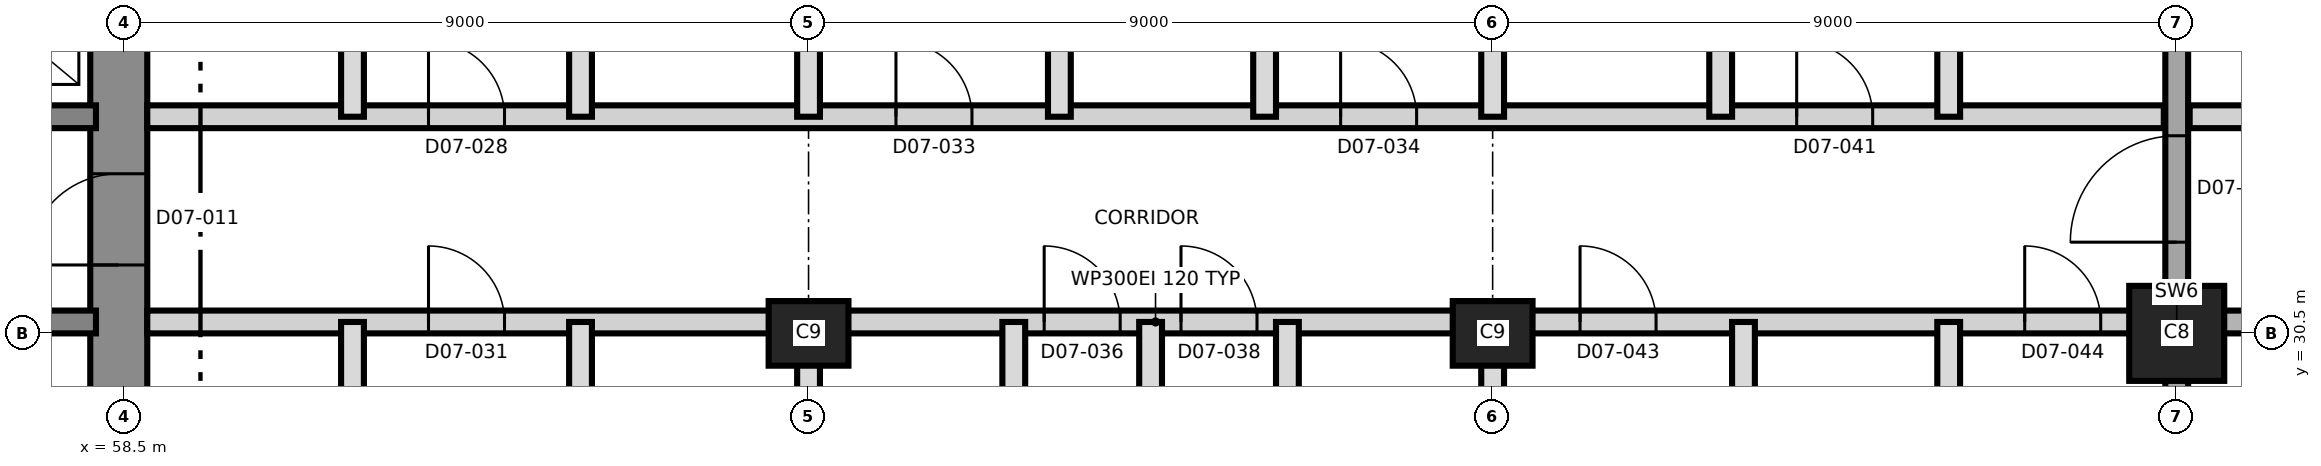
"""IFC4 building model, lengths in metres.
Left out: names, types, materials, properties, quantities, classifications, styles, units other than length and angle.
Written with IfcOpenShell. Run it as: python <this file> out.ifc"""

import sys

from ifc_helpers import new_model, si_unit, direction, frame, frame_2d, origin, origin_2d, place, context, subcontext, project, spatial, rectangle, extrude, element, fill, save


model = new_model("IFC4")
c1 = context("Model", 3, precision=1e-05, world=origin(), true_north=direction((0.0, 1.0)))
c2 = subcontext(c1, "Body", "Model", "MODEL_VIEW")
j1 = project(units=[si_unit("LENGTHUNIT", "METRE"), si_unit("PLANEANGLEUNIT", "RADIAN")], contexts=[c1])
p1 = place(None, origin())
s1 = spatial("IfcSite", under=j1, at=p1, CompositionType="ELEMENT")
p2 = place(p1, origin())
s2 = spatial("IfcBuilding", under=s1, at=p2, CompositionType="ELEMENT")
p3 = place(p2, frame((0.0, 0.0, 94.5)))
s3 = spatial("IfcBuildingStorey", under=s2, at=p3, CompositionType="ELEMENT", Elevation=94.5)
p4 = place(p3, frame((58.425, 21.125, 0.0), z_axis=(0.0, 0.0, 1.0), x_axis=(0.0, 1.0, 0.0)))
e1 = element("IfcWall", 1, at=p4, inside=s3, PredefinedType="SHEAR", context=c2, shape_type="SweptSolid", body=[
    extrude(rectangle(XDim=18.75, YDim=0.75, at=frame_2d((9.375, 0.0))), origin(), (0.0, 0.0, 1.0), 3.7),
])
p5 = place(p4, frame((10.275, 0.0, 0.0)))
e2 = element("IfcOpeningElement", 2, at=p5, cuts=e1, PredefinedType="OPENING", context=c2, shape_type="SweptSolid", body=[
    extrude(rectangle(XDim=1.2, YDim=2.1, at=frame_2d((0.6, 1.05))), frame((0.0, 0.385, 0.0), z_axis=(0.0, -1.0, 0.0), x_axis=(1.0, 0.0, 0.0)), (0.0, 0.0, 1.0), 0.77),
])
p6 = place(p3, frame((31.875, 30.65, 0.0), z_axis=(0.0, 0.0, 1.0), x_axis=(1.0, 0.0, 0.0)))
e3 = element("IfcWall", 3, at=p6, inside=s3, PredefinedType="SHEAR", context=c2, shape_type="SweptSolid", body=[
    extrude(rectangle(XDim=26.25, YDim=0.3, at=frame_2d((13.125, 0.0))), origin(), (0.0, 0.0, 1.0), 3.7),
])
p7 = place(p6, frame((24.625, 0.0, 0.0)))
e4 = element("IfcOpeningElement", 4, at=p7, cuts=e3, PredefinedType="OPENING", context=c2, shape_type="SweptSolid", body=[
    extrude(rectangle(XDim=1.0, YDim=2.1, at=frame_2d((0.5, 1.05))), frame((0.0, 0.16, 0.0), z_axis=(0.0, -1.0, 0.0), x_axis=(1.0, 0.0, 0.0)), (0.0, 0.0, 1.0), 0.32),
])
p8 = place(p6, frame((11.425, 0.0, 0.0)))
e5 = element("IfcOpeningElement", 5, at=p8, cuts=e3, PredefinedType="OPENING", context=c2, shape_type="SweptSolid", body=[
    extrude(rectangle(XDim=1.0, YDim=2.1, at=frame_2d((0.5, 1.05))), frame((0.0, 0.16, 0.0), z_axis=(0.0, -1.0, 0.0), x_axis=(1.0, 0.0, 0.0)), (0.0, 0.0, 1.0), 0.32),
])
p9 = place(p3, frame((31.875, 33.35, 0.0), z_axis=(0.0, 0.0, 1.0), x_axis=(1.0, 0.0, 0.0)))
e6 = element("IfcWall", 6, at=p9, inside=s3, PredefinedType="SHEAR", context=c2, shape_type="SweptSolid", body=[
    extrude(rectangle(XDim=26.25, YDim=0.3, at=frame_2d((13.125, 0.0))), origin(), (0.0, 0.0, 1.0), 3.7),
])
p10 = place(p9, frame((13.775, 0.0, 0.0)))
e7 = element("IfcOpeningElement", 7, at=p10, cuts=e6, PredefinedType="OPENING", context=c2, shape_type="SweptSolid", body=[
    extrude(rectangle(XDim=1.4, YDim=2.1, at=frame_2d((0.7, 1.05))), frame((0.0, 0.16, 0.0), z_axis=(0.0, -1.0, 0.0), x_axis=(1.0, 0.0, 0.0)), (0.0, 0.0, 1.0), 0.32),
])
p11 = place(p9, frame((5.25, 0.0, 0.0)))
e8 = element("IfcOpeningElement", 8, at=p11, cuts=e6, PredefinedType="OPENING", context=c2, shape_type="SweptSolid", body=[
    extrude(rectangle(XDim=1.2, YDim=2.1, at=frame_2d((0.6, 1.05))), frame((0.0, 0.16, 0.0), z_axis=(0.0, -1.0, 0.0), x_axis=(1.0, 0.0, 0.0)), (0.0, 0.0, 1.0), 0.32),
])
p12 = place(p9, frame((19.8, 0.0, 0.0)))
e9 = element("IfcOpeningElement", 9, at=p12, cuts=e6, PredefinedType="OPENING", context=c2, shape_type="SweptSolid", body=[
    extrude(rectangle(XDim=1.2, YDim=2.1, at=frame_2d((0.6, 1.05))), frame((0.0, 0.16, 0.0), z_axis=(0.0, -1.0, 0.0), x_axis=(1.0, 0.0, 0.0)), (0.0, 0.0, 1.0), 0.32),
])
for number, where, z_axis, x_axis in (
    (10, (67.5, 30.5, 0.0), (0.0, 0.0, 1.0), (1.0, 0.0, 0.0)),
    (11, (76.5, 30.5, 0.0), (0.0, 0.0, 1.0), (1.0, 0.0, 0.0)),
):
    element("IfcColumn", number, at=place(p3, frame(where, z_axis=z_axis, x_axis=x_axis)), inside=s3, PredefinedType="COLUMN", context=c2, shape_type="SweptSolid", body=[
        extrude(rectangle(XDim=1.05, YDim=0.85, at=origin_2d()), origin(), (0.0, 0.0, 1.0), 3.7),
    ])
p13 = place(p3, frame((85.5, 30.5, 0.0), z_axis=(0.0, 0.0, 1.0), x_axis=(1.0, 0.0, 0.0)))
e12 = element("IfcColumn", 12, at=p13, inside=s3, PredefinedType="COLUMN", context=c2, shape_type="SweptSolid", body=[
    extrude(rectangle(XDim=1.25, YDim=1.25, at=origin_2d()), origin(), (0.0, 0.0, 1.0), 3.7),
])
p14 = place(p3, frame((85.5, 20.995, 0.0), z_axis=(0.0, 0.0, 1.0), x_axis=(0.0, 1.0, 0.0)))
e13 = element("IfcWall", 13, at=p14, inside=s3, PredefinedType="SHEAR", context=c2, shape_type="SweptSolid", body=[
    extrude(rectangle(XDim=19.01, YDim=0.3, at=frame_2d((9.505, 0.0))), origin(), (0.0, 0.0, 1.0), 3.7),
])
p15 = place(p14, frame((10.705, 0.0, 0.0)))
e14 = element("IfcOpeningElement", 14, at=p15, cuts=e13, PredefinedType="OPENING", context=c2, shape_type="SweptSolid", body=[
    extrude(rectangle(XDim=1.4, YDim=2.1, at=frame_2d((0.7, 1.05))), frame((0.0, 0.16, 0.0), z_axis=(0.0, -1.0, 0.0), x_axis=(1.0, 0.0, 0.0)), (0.0, 0.0, 1.0), 0.32),
])
p16 = place(p3, frame((58.8, 30.65, 0.0), z_axis=(0.0, 0.0, 1.0), x_axis=(1.0, 0.0, 0.0)))
e15 = element("IfcWall", 15, at=p16, inside=s3, PredefinedType="PARTITIONING", context=c2, shape_type="SweptSolid", body=[
    extrude(rectangle(XDim=26.53, YDim=0.3, at=frame_2d((13.265, 0.0))), origin(), (0.0, 0.0, 1.0), 3.4),
])
p17 = place(p16, frame((3.7, 0.0, 0.0)))
e16 = element("IfcOpeningElement", 16, at=p17, cuts=e15, PredefinedType="OPENING", context=c2, shape_type="SweptSolid", body=[
    extrude(rectangle(XDim=1.0, YDim=2.4, at=frame_2d((0.5, 1.2))), frame((0.0, 0.16, 0.0), z_axis=(0.0, -1.0, 0.0), x_axis=(1.0, 0.0, 0.0)), (0.0, 0.0, 1.0), 0.32),
])
p18 = place(p16, frame((11.8, 0.0, 0.0)))
e17 = element("IfcOpeningElement", 17, at=p18, cuts=e15, PredefinedType="OPENING", context=c2, shape_type="SweptSolid", body=[
    extrude(rectangle(XDim=1.0, YDim=2.1, at=frame_2d((0.5, 1.05))), frame((0.0, 0.16, 0.0), z_axis=(0.0, -1.0, 0.0), x_axis=(1.0, 0.0, 0.0)), (0.0, 0.0, 1.0), 0.32),
])
p19 = place(p16, frame((13.6, 0.0, 0.0)))
e18 = element("IfcOpeningElement", 18, at=p19, cuts=e15, PredefinedType="OPENING", context=c2, shape_type="SweptSolid", body=[
    extrude(rectangle(XDim=1.0, YDim=2.1, at=frame_2d((0.5, 1.05))), frame((0.0, 0.16, 0.0), z_axis=(0.0, -1.0, 0.0), x_axis=(1.0, 0.0, 0.0)), (0.0, 0.0, 1.0), 0.32),
])
p20 = place(p16, frame((18.85, 0.0, 0.0)))
e19 = element("IfcOpeningElement", 19, at=p20, cuts=e15, PredefinedType="OPENING", context=c2, shape_type="SweptSolid", body=[
    extrude(rectangle(XDim=1.0, YDim=2.1, at=frame_2d((0.5, 1.05))), frame((0.0, 0.16, 0.0), z_axis=(0.0, -1.0, 0.0), x_axis=(1.0, 0.0, 0.0)), (0.0, 0.0, 1.0), 0.32),
])
p21 = place(p16, frame((24.7, 0.0, 0.0)))
e20 = element("IfcOpeningElement", 20, at=p21, cuts=e15, PredefinedType="OPENING", context=c2, shape_type="SweptSolid", body=[
    extrude(rectangle(XDim=1.0, YDim=2.1, at=frame_2d((0.5, 1.05))), frame((0.0, 0.16, 0.0), z_axis=(0.0, -1.0, 0.0), x_axis=(1.0, 0.0, 0.0)), (0.0, 0.0, 1.0), 0.32),
])
p22 = place(p3, frame((85.67, 30.65, 0.0), z_axis=(0.0, 0.0, 1.0), x_axis=(1.0, 0.0, 0.0)))
e21 = element("IfcWall", 21, at=p22, inside=s3, PredefinedType="SHEAR", context=c2, shape_type="SweptSolid", body=[
    extrude(rectangle(XDim=9.335, YDim=0.3, at=frame_2d((4.667, 0.0))), origin(), (0.0, 0.0, 1.0), 3.4),
])
p23 = place(p22, frame((2.08, 0.0, 0.0)))
e22 = element("IfcOpeningElement", 22, at=p23, cuts=e21, PredefinedType="OPENING", context=c2, shape_type="SweptSolid", body=[
    extrude(rectangle(XDim=1.2, YDim=2.1, at=frame_2d((0.6, 1.05))), frame((0.0, 0.16, 0.0), z_axis=(0.0, -1.0, 0.0), x_axis=(1.0, 0.0, 0.0)), (0.0, 0.0, 1.0), 0.32),
])
p24 = place(p22, frame((5.63, 0.0, 0.0)))
e23 = element("IfcOpeningElement", 23, at=p24, cuts=e21, PredefinedType="OPENING", context=c2, shape_type="SweptSolid", body=[
    extrude(rectangle(XDim=1.0, YDim=2.1, at=frame_2d((0.5, 1.05))), frame((0.0, 0.16, 0.0), z_axis=(0.0, -1.0, 0.0), x_axis=(1.0, 0.0, 0.0)), (0.0, 0.0, 1.0), 0.32),
])
p25 = place(p3, frame((58.8, 33.35, 0.0), z_axis=(0.0, 0.0, 1.0), x_axis=(1.0, 0.0, 0.0)))
e24 = element("IfcWall", 24, at=p25, inside=s3, PredefinedType="PARTITIONING", context=c2, shape_type="SweptSolid", body=[
    extrude(rectangle(XDim=26.53, YDim=0.3, at=frame_2d((13.265, 0.0))), origin(), (0.0, 0.0, 1.0), 3.4),
])
p26 = place(p25, frame((3.7, 0.0, 0.0)))
e25 = element("IfcOpeningElement", 25, at=p26, cuts=e24, PredefinedType="OPENING", context=c2, shape_type="SweptSolid", body=[
    extrude(rectangle(XDim=1.0, YDim=2.4, at=frame_2d((0.5, 1.2))), frame((0.0, 0.16, 0.0), z_axis=(0.0, -1.0, 0.0), x_axis=(1.0, 0.0, 0.0)), (0.0, 0.0, 1.0), 0.32),
])
p27 = place(p25, frame((9.85, 0.0, 0.0)))
e26 = element("IfcOpeningElement", 26, at=p27, cuts=e24, PredefinedType="OPENING", context=c2, shape_type="SweptSolid", body=[
    extrude(rectangle(XDim=1.0, YDim=2.1, at=frame_2d((0.5, 1.05))), frame((0.0, 0.16, 0.0), z_axis=(0.0, -1.0, 0.0), x_axis=(1.0, 0.0, 0.0)), (0.0, 0.0, 1.0), 0.32),
])
p28 = place(p25, frame((15.7, 0.0, 0.0)))
e27 = element("IfcOpeningElement", 27, at=p28, cuts=e24, PredefinedType="OPENING", context=c2, shape_type="SweptSolid", body=[
    extrude(rectangle(XDim=1.0, YDim=2.1, at=frame_2d((0.5, 1.05))), frame((0.0, 0.16, 0.0), z_axis=(0.0, -1.0, 0.0), x_axis=(1.0, 0.0, 0.0)), (0.0, 0.0, 1.0), 0.32),
])
p29 = place(p25, frame((21.7, 0.0, 0.0)))
e28 = element("IfcOpeningElement", 28, at=p29, cuts=e24, PredefinedType="OPENING", context=c2, shape_type="SweptSolid", body=[
    extrude(rectangle(XDim=1.0, YDim=2.4, at=frame_2d((0.5, 1.2))), frame((0.0, 0.16, 0.0), z_axis=(0.0, -1.0, 0.0), x_axis=(1.0, 0.0, 0.0)), (0.0, 0.0, 1.0), 0.32),
])
p30 = place(p3, frame((85.67, 33.35, 0.0), z_axis=(0.0, 0.0, 1.0), x_axis=(1.0, 0.0, 0.0)))
e29 = element("IfcWall", 29, at=p30, inside=s3, PredefinedType="PARTITIONING", context=c2, shape_type="SweptSolid", body=[
    extrude(rectangle(XDim=9.237, YDim=0.3, at=frame_2d((4.619, 0.0))), origin(), (0.0, 0.0, 1.0), 3.35),
])
p31 = place(p30, frame((1.83, 0.0, 0.0)))
e30 = element("IfcOpeningElement", 30, at=p31, cuts=e29, PredefinedType="OPENING", context=c2, shape_type="SweptSolid", body=[
    extrude(rectangle(XDim=1.0, YDim=2.1, at=frame_2d((0.5, 1.05))), frame((0.0, 0.16, 0.0), z_axis=(0.0, -1.0, 0.0), x_axis=(1.0, 0.0, 0.0)), (0.0, 0.0, 1.0), 0.32),
])
p32 = place(p30, frame((5.63, 0.0, 0.0)))
e31 = element("IfcOpeningElement", 31, at=p32, cuts=e29, PredefinedType="OPENING", context=c2, shape_type="SweptSolid", body=[
    extrude(rectangle(XDim=1.0, YDim=2.1, at=frame_2d((0.5, 1.05))), frame((0.0, 0.16, 0.0), z_axis=(0.0, -1.0, 0.0), x_axis=(1.0, 0.0, 0.0)), (0.0, 0.0, 1.0), 0.32),
])
for number, where, z_axis, x_axis in (
    (32, (61.5, 27.35, 0.0), (0.0, 0.0, 1.0), (0.0, 1.0, 0.0)),
    (33, (61.5, 33.35, 0.0), (0.0, 0.0, 1.0), (0.0, 1.0, 0.0)),
    (34, (64.5, 27.35, 0.0), (0.0, 0.0, 1.0), (0.0, 1.0, 0.0)),
    (35, (64.5, 33.35, 0.0), (0.0, 0.0, 1.0), (0.0, 1.0, 0.0)),
):
    element("IfcWall", number, at=place(p3, frame(where, z_axis=z_axis, x_axis=x_axis)), inside=s3, PredefinedType="PARTITIONING", context=c2, shape_type="SweptSolid", body=[
        extrude(rectangle(XDim=3.3, YDim=0.3, at=frame_2d((1.65, 0.0))), origin(), (0.0, 0.0, 1.0), 3.4),
    ])
p33 = place(p3, frame((67.5, 20.995, 0.0), z_axis=(0.0, 0.0, 1.0), x_axis=(0.0, 1.0, 0.0)))
e36 = element("IfcWall", 36, at=p33, inside=s3, PredefinedType="PARTITIONING", context=c2, shape_type="SweptSolid", body=[
    extrude(rectangle(XDim=9.655, YDim=0.3, at=frame_2d((4.827, 0.0))), origin(), (0.0, 0.0, 1.0), 3.35),
])
p34 = place(p3, frame((67.5, 33.35, 0.0), z_axis=(0.0, 0.0, 1.0), x_axis=(0.0, 1.0, 0.0)))
e37 = element("IfcWall", 37, at=p34, inside=s3, PredefinedType="PARTITIONING", context=c2, shape_type="SweptSolid", body=[
    extrude(rectangle(XDim=6.655, YDim=0.3, at=frame_2d((3.327, 0.0))), origin(), (0.0, 0.0, 1.0), 3.35),
])
for number, where, z_axis, x_axis in (
    (38, (70.2, 27.45, 0.0), (0.0, 0.0, 1.0), (0.0, 1.0, 0.0)),
    (39, (70.8, 33.35, 0.0), (0.0, 0.0, 1.0), (0.0, 1.0, 0.0)),
):
    element("IfcWall", number, at=place(p3, frame(where, z_axis=z_axis, x_axis=x_axis)), inside=s3, PredefinedType="PARTITIONING", context=c2, shape_type="SweptSolid", body=[
        extrude(rectangle(XDim=3.2, YDim=0.3, at=frame_2d((1.6, 0.0))), origin(), (0.0, 0.0, 1.0), 3.4),
    ])
p35 = place(p3, frame((72.0, 20.995, 0.0), z_axis=(0.0, 0.0, 1.0), x_axis=(0.0, 1.0, 0.0)))
e40 = element("IfcWall", 40, at=p35, inside=s3, PredefinedType="PARTITIONING", context=c2, shape_type="SweptSolid", body=[
    extrude(rectangle(XDim=9.655, YDim=0.3, at=frame_2d((4.827, 0.0))), origin(), (0.0, 0.0, 1.0), 3.35),
])
p36 = place(p3, frame((73.5, 33.35, 0.0), z_axis=(0.0, 0.0, 1.0), x_axis=(0.0, 1.0, 0.0)))
e41 = element("IfcWall", 41, at=p36, inside=s3, PredefinedType="PARTITIONING", context=c2, shape_type="SweptSolid", body=[
    extrude(rectangle(XDim=6.835, YDim=0.3, at=frame_2d((3.417, 0.0))), origin(), (0.0, 0.0, 1.0), 3.35),
])
p37 = place(p3, frame((73.8, 27.45, 0.0), z_axis=(0.0, 0.0, 1.0), x_axis=(0.0, 1.0, 0.0)))
e42 = element("IfcWall", 42, at=p37, inside=s3, PredefinedType="PARTITIONING", context=c2, shape_type="SweptSolid", body=[
    extrude(rectangle(XDim=3.2, YDim=0.3, at=frame_2d((1.6, 0.0))), origin(), (0.0, 0.0, 1.0), 3.4),
])
p38 = place(p3, frame((76.5, 20.995, 0.0), z_axis=(0.0, 0.0, 1.0), x_axis=(0.0, 1.0, 0.0)))
e43 = element("IfcWall", 43, at=p38, inside=s3, PredefinedType="PARTITIONING", context=c2, shape_type="SweptSolid", body=[
    extrude(rectangle(XDim=9.655, YDim=0.3, at=frame_2d((4.827, 0.0))), origin(), (0.0, 0.0, 1.0), 3.35),
])
p39 = place(p3, frame((76.5, 33.35, 0.0), z_axis=(0.0, 0.0, 1.0), x_axis=(0.0, 1.0, 0.0)))
e44 = element("IfcWall", 44, at=p39, inside=s3, PredefinedType="PARTITIONING", context=c2, shape_type="SweptSolid", body=[
    extrude(rectangle(XDim=6.655, YDim=0.3, at=frame_2d((3.327, 0.0))), origin(), (0.0, 0.0, 1.0), 3.35),
])
p40 = place(p3, frame((79.5, 33.35, 0.0), z_axis=(0.0, 0.0, 1.0), x_axis=(0.0, 1.0, 0.0)))
e45 = element("IfcWall", 45, at=p40, inside=s3, PredefinedType="PARTITIONING", context=c2, shape_type="SweptSolid", body=[
    extrude(rectangle(XDim=3.3, YDim=0.3, at=frame_2d((1.65, 0.0))), origin(), (0.0, 0.0, 1.0), 3.4),
])
p41 = place(p3, frame((79.8, 27.45, 0.0), z_axis=(0.0, 0.0, 1.0), x_axis=(0.0, 1.0, 0.0)))
e46 = element("IfcWall", 46, at=p41, inside=s3, PredefinedType="PARTITIONING", context=c2, shape_type="SweptSolid", body=[
    extrude(rectangle(XDim=3.2, YDim=0.3, at=frame_2d((1.6, 0.0))), origin(), (0.0, 0.0, 1.0), 3.4),
])
p42 = place(p3, frame((82.5, 20.995, 0.0), z_axis=(0.0, 0.0, 1.0), x_axis=(0.0, 1.0, 0.0)))
e47 = element("IfcWall", 47, at=p42, inside=s3, PredefinedType="PARTITIONING", context=c2, shape_type="SweptSolid", body=[
    extrude(rectangle(XDim=9.655, YDim=0.3, at=frame_2d((4.827, 0.0))), origin(), (0.0, 0.0, 1.0), 3.35),
])
p43 = place(p3, frame((82.5, 33.35, 0.0), z_axis=(0.0, 0.0, 1.0), x_axis=(0.0, 1.0, 0.0)))
e48 = element("IfcWall", 48, at=p43, inside=s3, PredefinedType="PARTITIONING", context=c2, shape_type="SweptSolid", body=[
    extrude(rectangle(XDim=3.3, YDim=0.3, at=frame_2d((1.65, 0.0))), origin(), (0.0, 0.0, 1.0), 3.4),
])
p44 = place(p5, origin())
e49 = element("IfcDoor", 49, at=p44, inside=s3, OperationType="SINGLE_SWING_LEFT", PredefinedType="DOOR", context=c2, shape_type="SweptSolid", body=[
    extrude(rectangle(XDim=1.2, YDim=2.1, at=frame_2d((0.6, 1.05))), frame((0.0, 0.025, 0.0), z_axis=(0.0, -1.0, 0.0), x_axis=(1.0, 0.0, 0.0)), (0.0, 0.0, 1.0), 0.05),
])
fill(e2, e49)
p45 = place(p26, origin())
e50 = element("IfcDoor", 50, at=p45, inside=s3, OperationType="SINGLE_SWING_LEFT", PredefinedType="DOOR", context=c2, shape_type="SweptSolid", body=[
    extrude(rectangle(XDim=1.0, YDim=2.4, at=frame_2d((0.5, 1.2))), frame((0.0, 0.025, 0.0), z_axis=(0.0, -1.0, 0.0), x_axis=(1.0, 0.0, 0.0)), (0.0, 0.0, 1.0), 0.05),
])
fill(e25, e50)
p46 = place(p17, origin())
e51 = element("IfcDoor", 51, at=p46, inside=s3, OperationType="SINGLE_SWING_LEFT", PredefinedType="DOOR", context=c2, shape_type="SweptSolid", body=[
    extrude(rectangle(XDim=1.0, YDim=2.4, at=frame_2d((0.5, 1.2))), frame((0.0, 0.025, 0.0), z_axis=(0.0, -1.0, 0.0), x_axis=(1.0, 0.0, 0.0)), (0.0, 0.0, 1.0), 0.05),
])
fill(e16, e51)
p47 = place(p27, origin())
e52 = element("IfcDoor", 52, at=p47, inside=s3, OperationType="SINGLE_SWING_LEFT", PredefinedType="DOOR", context=c2, shape_type="SweptSolid", body=[
    extrude(rectangle(XDim=1.0, YDim=2.1, at=frame_2d((0.5, 1.05))), frame((0.0, 0.025, 0.0), z_axis=(0.0, -1.0, 0.0), x_axis=(1.0, 0.0, 0.0)), (0.0, 0.0, 1.0), 0.05),
])
fill(e26, e52)
p48 = place(p28, origin())
e53 = element("IfcDoor", 53, at=p48, inside=s3, OperationType="SINGLE_SWING_RIGHT", PredefinedType="DOOR", context=c2, shape_type="SweptSolid", body=[
    extrude(rectangle(XDim=1.0, YDim=2.1, at=frame_2d((0.5, 1.05))), frame((0.0, 0.025, 0.0), z_axis=(0.0, -1.0, 0.0), x_axis=(1.0, 0.0, 0.0)), (0.0, 0.0, 1.0), 0.05),
])
fill(e27, e53)
p49 = place(p18, origin())
e54 = element("IfcDoor", 54, at=p49, inside=s3, OperationType="SINGLE_SWING_LEFT", PredefinedType="DOOR", context=c2, shape_type="SweptSolid", body=[
    extrude(rectangle(XDim=1.0, YDim=2.1, at=frame_2d((0.5, 1.05))), frame((0.0, 0.025, 0.0), z_axis=(0.0, -1.0, 0.0), x_axis=(1.0, 0.0, 0.0)), (0.0, 0.0, 1.0), 0.05),
])
fill(e17, e54)
p50 = place(p19, origin())
e55 = element("IfcDoor", 55, at=p50, inside=s3, OperationType="SINGLE_SWING_RIGHT", PredefinedType="DOOR", context=c2, shape_type="SweptSolid", body=[
    extrude(rectangle(XDim=1.0, YDim=2.1, at=frame_2d((0.5, 1.05))), frame((0.0, 0.025, 0.0), z_axis=(0.0, -1.0, 0.0), x_axis=(1.0, 0.0, 0.0)), (0.0, 0.0, 1.0), 0.05),
])
fill(e18, e55)
p51 = place(p29, origin())
e56 = element("IfcDoor", 56, at=p51, inside=s3, OperationType="SINGLE_SWING_LEFT", PredefinedType="DOOR", context=c2, shape_type="SweptSolid", body=[
    extrude(rectangle(XDim=1.0, YDim=2.4, at=frame_2d((0.5, 1.2))), frame((0.0, 0.025, 0.0), z_axis=(0.0, -1.0, 0.0), x_axis=(1.0, 0.0, 0.0)), (0.0, 0.0, 1.0), 0.05),
])
fill(e28, e56)
p52 = place(p20, origin())
e57 = element("IfcDoor", 57, at=p52, inside=s3, OperationType="SINGLE_SWING_LEFT", PredefinedType="DOOR", context=c2, shape_type="SweptSolid", body=[
    extrude(rectangle(XDim=1.0, YDim=2.1, at=frame_2d((0.5, 1.05))), frame((0.0, 0.025, 0.0), z_axis=(0.0, -1.0, 0.0), x_axis=(1.0, 0.0, 0.0)), (0.0, 0.0, 1.0), 0.05),
])
fill(e19, e57)
p53 = place(p21, origin())
e58 = element("IfcDoor", 58, at=p53, inside=s3, OperationType="SINGLE_SWING_LEFT", PredefinedType="DOOR", context=c2, shape_type="SweptSolid", body=[
    extrude(rectangle(XDim=1.0, YDim=2.1, at=frame_2d((0.5, 1.05))), frame((0.0, 0.025, 0.0), z_axis=(0.0, -1.0, 0.0), x_axis=(1.0, 0.0, 0.0)), (0.0, 0.0, 1.0), 0.05),
])
fill(e20, e58)
p54 = place(p15, origin())
e59 = element("IfcDoor", 59, at=p54, inside=s3, OperationType="SINGLE_SWING_RIGHT", PredefinedType="DOOR", context=c2, shape_type="SweptSolid", body=[
    extrude(rectangle(XDim=1.4, YDim=2.1, at=frame_2d((0.7, 1.05))), frame((0.0, 0.025, 0.0), z_axis=(0.0, -1.0, 0.0), x_axis=(1.0, 0.0, 0.0)), (0.0, 0.0, 1.0), 0.05),
])
fill(e14, e59)
save(model, sys.argv[1])
